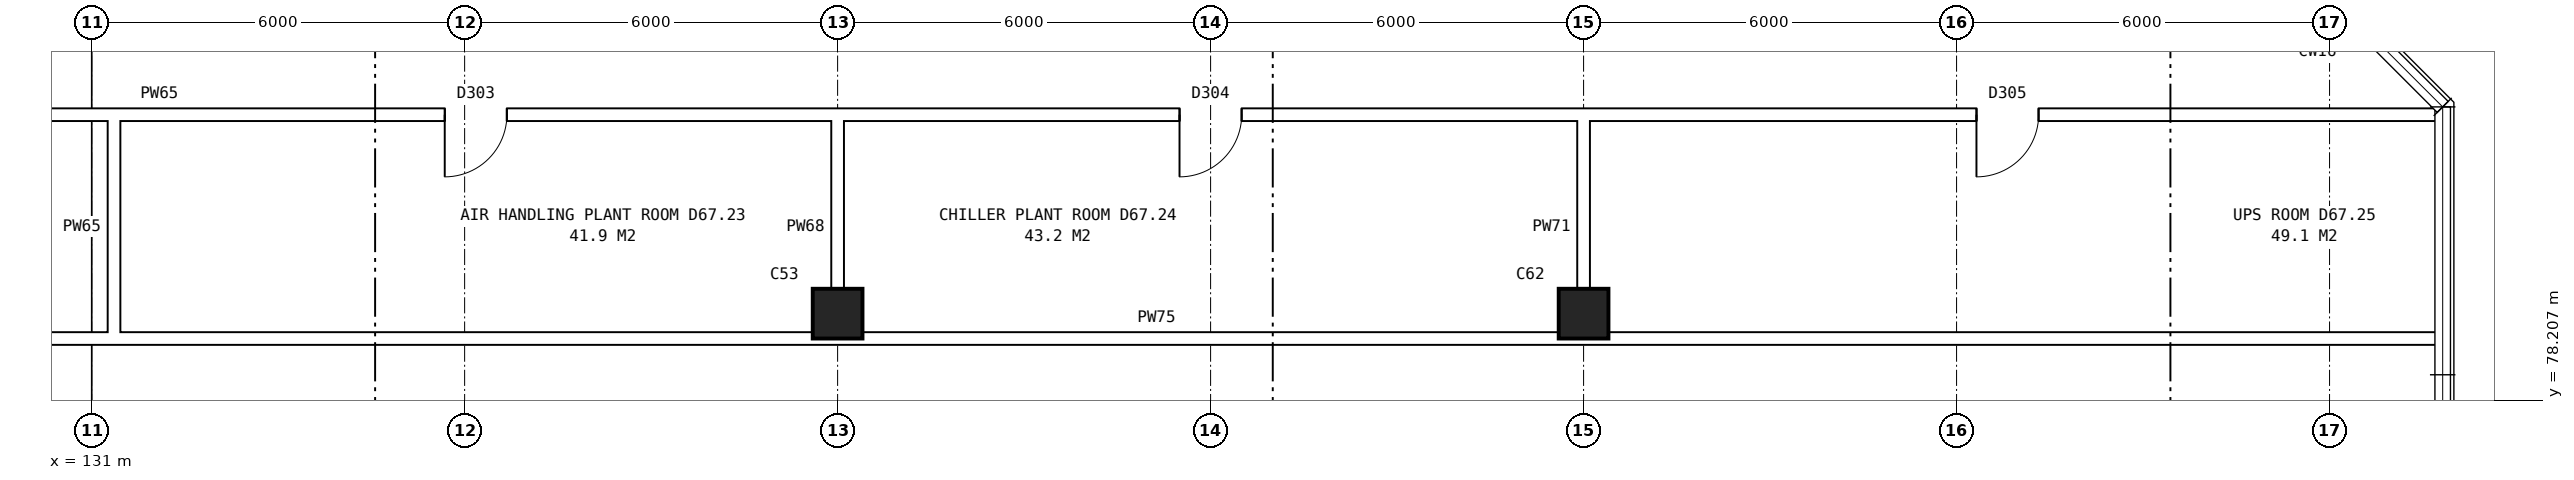
"""IFC4 building model, lengths in metres.
Left out: names, types, materials, properties, quantities, classifications, styles, units other than length and angle.
Written with IfcOpenShell. Run it as: python <this file> out.ifc"""

import sys

from ifc_helpers import new_model, si_unit, direction, frame, frame_2d, origin, origin_2d, place, context, subcontext, project, spatial, rectangle, extrude, element, fill, save


model = new_model("IFC4")
c1 = context("Model", 3, precision=1e-05, world=origin(), true_north=direction((0.0, 1.0)))
c2 = subcontext(c1, "Body", "Model", "MODEL_VIEW")
j1 = project(units=[si_unit("LENGTHUNIT", "METRE"), si_unit("PLANEANGLEUNIT", "RADIAN")], contexts=[c1])
p1 = place(None, origin())
s1 = spatial("IfcSite", under=j1, at=p1, CompositionType="ELEMENT")
p2 = place(p1, origin())
s2 = spatial("IfcBuilding", under=s1, at=p2, CompositionType="ELEMENT")
p3 = place(p2, frame((0.0, 0.0, 236.9)))
s3 = spatial("IfcBuildingStorey", under=s2, at=p3, CompositionType="ELEMENT", Elevation=236.9)
for number, where, z_axis, x_axis in (
    (1, (143.0, 79.6, 0.0), (0.0, 0.0, 1.0), (1.0, 0.0, 0.0)),
    (2, (155.0, 79.6, 0.0), (0.0, 0.0, 1.0), (1.0, 0.0, 0.0)),
):
    element("IfcColumn", number, at=place(p3, frame(where, z_axis=z_axis, x_axis=x_axis)), inside=s3, PredefinedType="COLUMN", context=c2, shape_type="SweptSolid", body=[
        extrude(rectangle(XDim=0.8, YDim=0.8, at=origin_2d()), origin(), (0.0, 0.0, 1.0), 6.7),
    ])
p4 = place(p3, frame((46.66, 79.2, 0.0), z_axis=(0.0, 0.0, 1.0), x_axis=(1.0, 0.0, 0.0)))
e3 = element("IfcWall", 3, at=p4, inside=s3, PredefinedType="PARTITIONING", context=c2, shape_type="SweptSolid", body=[
    extrude(rectangle(XDim=122.1, YDim=0.2, at=frame_2d((61.05, 0.0))), origin(), (0.0, 0.0, 1.0), 6.7),
])
p5 = place(p3, frame((46.66, 82.8, 0.0), z_axis=(0.0, 0.0, 1.0), x_axis=(1.0, 0.0, 0.0)))
e4 = element("IfcWall", 4, at=p5, inside=s3, PredefinedType="PARTITIONING", context=c2, shape_type="SweptSolid", body=[
    extrude(rectangle(XDim=122.1, YDim=0.2, at=frame_2d((61.05, 0.0))), origin(), (0.0, 0.0, 1.0), 6.7),
])
p6 = place(p5, frame((5.22, 0.0, 0.0)))
e5 = element("IfcOpeningElement", 5, at=p6, cuts=e4, PredefinedType="OPENING", context=c2, shape_type="SweptSolid", body=[
    extrude(rectangle(XDim=1.0, YDim=2.1, at=frame_2d((0.5, 1.05))), frame((0.0, 0.11, 0.0), z_axis=(0.0, -1.0, 0.0), x_axis=(1.0, 0.0, 0.0)), (0.0, 0.0, 1.0), 0.22),
])
p7 = place(p5, frame((16.84, 0.0, 0.0)))
e6 = element("IfcOpeningElement", 6, at=p7, cuts=e4, PredefinedType="OPENING", context=c2, shape_type="SweptSolid", body=[
    extrude(rectangle(XDim=1.0, YDim=2.1, at=frame_2d((0.5, 1.05))), frame((0.0, 0.11, 0.0), z_axis=(0.0, -1.0, 0.0), x_axis=(1.0, 0.0, 0.0)), (0.0, 0.0, 1.0), 0.22),
])
p8 = place(p5, frame((25.66, 0.0, 0.0)))
e7 = element("IfcOpeningElement", 7, at=p8, cuts=e4, PredefinedType="OPENING", context=c2, shape_type="SweptSolid", body=[
    extrude(rectangle(XDim=1.0, YDim=2.1, at=frame_2d((0.5, 1.05))), frame((0.0, 0.11, 0.0), z_axis=(0.0, -1.0, 0.0), x_axis=(1.0, 0.0, 0.0)), (0.0, 0.0, 1.0), 0.22),
])
p9 = place(p5, frame((35.535, 0.0, 0.0)))
e8 = element("IfcOpeningElement", 8, at=p9, cuts=e4, PredefinedType="OPENING", context=c2, shape_type="SweptSolid", body=[
    extrude(rectangle(XDim=1.0, YDim=2.1, at=frame_2d((0.5, 1.05))), frame((0.0, 0.11, 0.0), z_axis=(0.0, -1.0, 0.0), x_axis=(1.0, 0.0, 0.0)), (0.0, 0.0, 1.0), 0.22),
])
p10 = place(p5, frame((52.902, 0.0, 0.0)))
e9 = element("IfcOpeningElement", 9, at=p10, cuts=e4, PredefinedType="OPENING", context=c2, shape_type="SweptSolid", body=[
    extrude(rectangle(XDim=1.0, YDim=2.1, at=frame_2d((0.5, 1.05))), frame((0.0, 0.11, 0.0), z_axis=(0.0, -1.0, 0.0), x_axis=(1.0, 0.0, 0.0)), (0.0, 0.0, 1.0), 0.22),
])
p11 = place(p5, frame((73.708, 0.0, 0.0)))
e10 = element("IfcOpeningElement", 10, at=p11, cuts=e4, PredefinedType="OPENING", context=c2, shape_type="SweptSolid", body=[
    extrude(rectangle(XDim=1.0, YDim=2.1, at=frame_2d((0.5, 1.05))), frame((0.0, 0.11, 0.0), z_axis=(0.0, -1.0, 0.0), x_axis=(1.0, 0.0, 0.0)), (0.0, 0.0, 1.0), 0.22),
])
p12 = place(p5, frame((90.02, 0.0, 0.0)))
e11 = element("IfcOpeningElement", 11, at=p12, cuts=e4, PredefinedType="OPENING", context=c2, shape_type="SweptSolid", body=[
    extrude(rectangle(XDim=1.0, YDim=2.1, at=frame_2d((0.5, 1.05))), frame((0.0, 0.11, 0.0), z_axis=(0.0, -1.0, 0.0), x_axis=(1.0, 0.0, 0.0)), (0.0, 0.0, 1.0), 0.22),
])
p13 = place(p5, frame((101.84, 0.0, 0.0)))
e12 = element("IfcOpeningElement", 12, at=p13, cuts=e4, PredefinedType="OPENING", context=c2, shape_type="SweptSolid", body=[
    extrude(rectangle(XDim=1.0, YDim=2.1, at=frame_2d((0.5, 1.05))), frame((0.0, 0.11, 0.0), z_axis=(0.0, -1.0, 0.0), x_axis=(1.0, 0.0, 0.0)), (0.0, 0.0, 1.0), 0.22),
])
p14 = place(p5, frame((114.66, 0.0, 0.0)))
e13 = element("IfcOpeningElement", 13, at=p14, cuts=e4, PredefinedType="OPENING", context=c2, shape_type="SweptSolid", body=[
    extrude(rectangle(XDim=1.0, YDim=2.1, at=frame_2d((0.5, 1.05))), frame((0.0, 0.11, 0.0), z_axis=(0.0, -1.0, 0.0), x_axis=(1.0, 0.0, 0.0)), (0.0, 0.0, 1.0), 0.22),
])
for number, where, z_axis, x_axis in (
    (14, (131.36, 79.1, 0.0), (0.0, 0.0, 1.0), (0.0, 1.0, 0.0)),
    (15, (143.0, 79.1, 0.0), (0.0, 0.0, 1.0), (0.0, 1.0, 0.0)),
    (16, (155.0, 79.1, 0.0), (0.0, 0.0, 1.0), (0.0, 1.0, 0.0)),
):
    element("IfcWall", number, at=place(p3, frame(where, z_axis=z_axis, x_axis=x_axis)), inside=s3, PredefinedType="PARTITIONING", context=c2, shape_type="SweptSolid", body=[
        extrude(rectangle(XDim=3.8, YDim=0.2, at=frame_2d((1.9, 0.0))), origin(), (0.0, 0.0, 1.0), 6.7),
    ])
p15 = place(p12, frame((1.0, 0.0, 0.0), z_axis=(0.0, 0.0, 1.0), x_axis=(-1.0, 0.0, 0.0)))
e17 = element("IfcDoor", 17, at=p15, inside=s3, OperationType="SINGLE_SWING_RIGHT", PredefinedType="DOOR", context=c2, shape_type="SweptSolid", body=[
    extrude(rectangle(XDim=1.0, YDim=2.1, at=frame_2d((0.5, 1.05))), frame((0.0, 0.025, 0.0), z_axis=(0.0, -1.0, 0.0), x_axis=(1.0, 0.0, 0.0)), (0.0, 0.0, 1.0), 0.05),
])
fill(e11, e17)
p16 = place(p13, frame((1.0, 0.0, 0.0), z_axis=(0.0, 0.0, 1.0), x_axis=(-1.0, 0.0, 0.0)))
e18 = element("IfcDoor", 18, at=p16, inside=s3, OperationType="SINGLE_SWING_RIGHT", PredefinedType="DOOR", context=c2, shape_type="SweptSolid", body=[
    extrude(rectangle(XDim=1.0, YDim=2.1, at=frame_2d((0.5, 1.05))), frame((0.0, 0.025, 0.0), z_axis=(0.0, -1.0, 0.0), x_axis=(1.0, 0.0, 0.0)), (0.0, 0.0, 1.0), 0.05),
])
fill(e12, e18)
p17 = place(p14, frame((1.0, 0.0, 0.0), z_axis=(0.0, 0.0, 1.0), x_axis=(-1.0, 0.0, 0.0)))
e19 = element("IfcDoor", 19, at=p17, inside=s3, OperationType="SINGLE_SWING_RIGHT", PredefinedType="DOOR", context=c2, shape_type="SweptSolid", body=[
    extrude(rectangle(XDim=1.0, YDim=2.1, at=frame_2d((0.5, 1.05))), frame((0.0, 0.025, 0.0), z_axis=(0.0, -1.0, 0.0), x_axis=(1.0, 0.0, 0.0)), (0.0, 0.0, 1.0), 0.05),
])
fill(e13, e19)
save(model, sys.argv[1])
